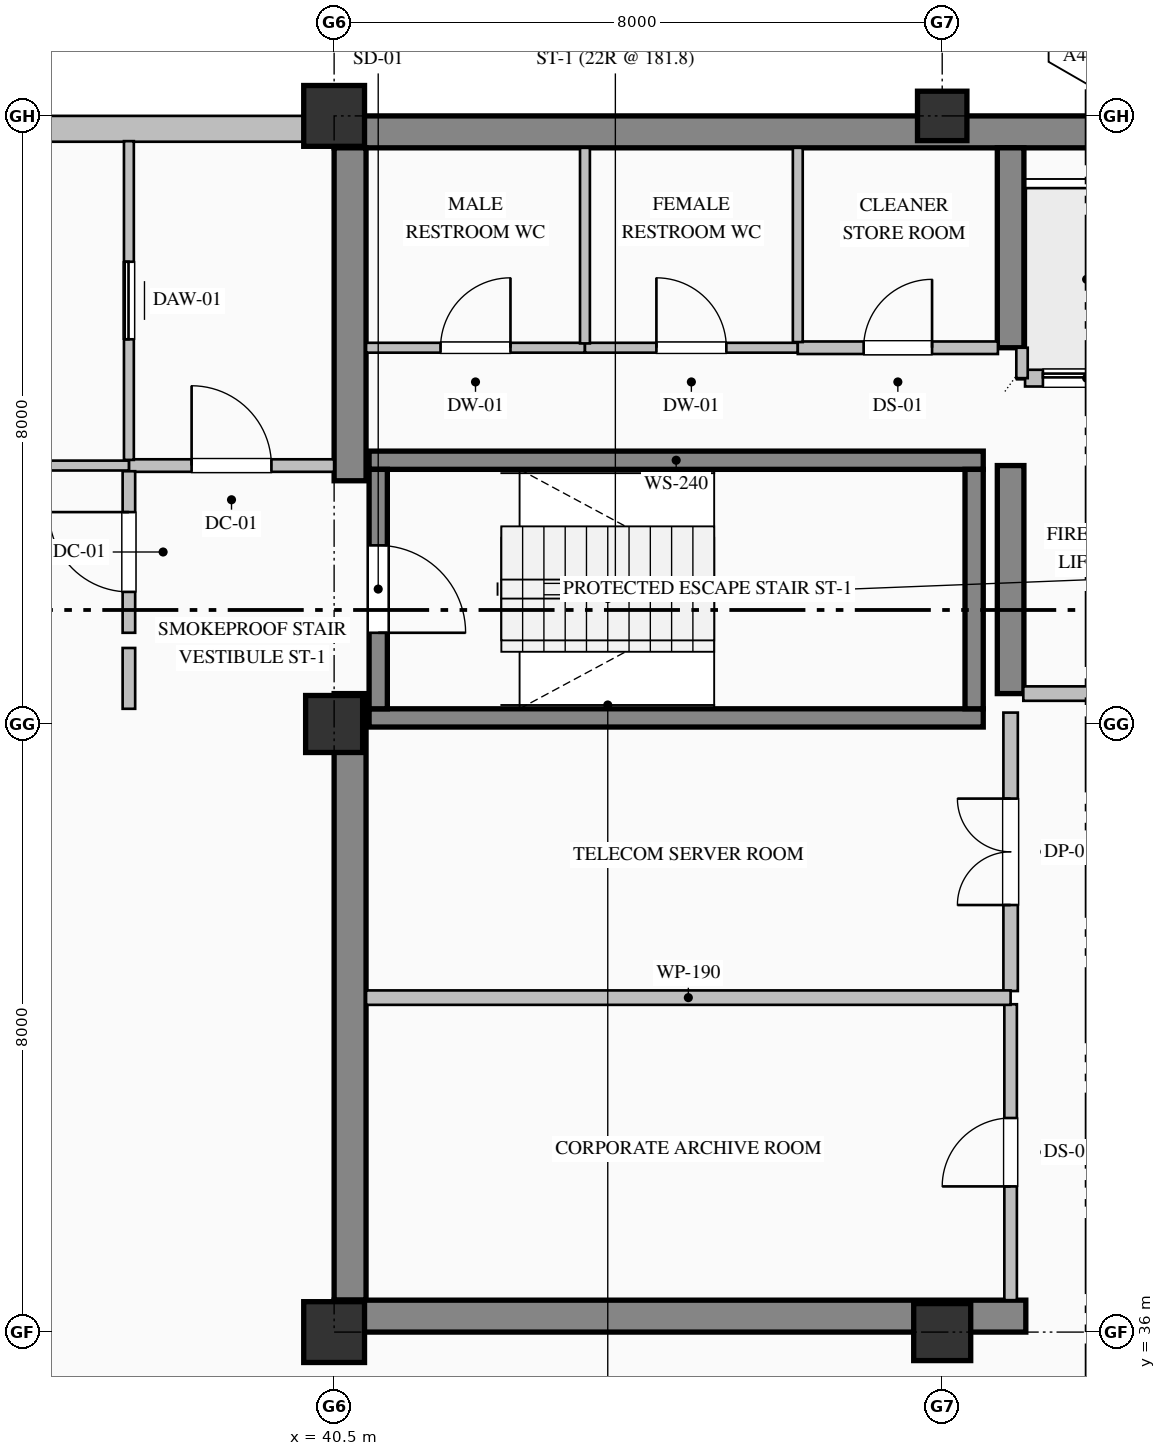
"""IFC4 building model, lengths in metres.
Left out: names, types, materials, properties, quantities, classifications, styles, units other than length and angle.
Written with IfcOpenShell. Run it as: python <this file> out.ifc"""

import sys

from ifc_helpers import new_model, si_unit, direction, frame, frame_2d, origin, origin_2d, place, context, subcontext, project, spatial, rectangle, hollow_rectangle, extrude, element, fill, save


model = new_model("IFC4")
c1 = context("Model", 3, precision=1e-05, world=origin(), true_north=direction((0.0, 1.0)))
c2 = subcontext(c1, "Body", "Model", "MODEL_VIEW")
j1 = project(units=[si_unit("LENGTHUNIT", "METRE"), si_unit("PLANEANGLEUNIT", "RADIAN")], contexts=[c1])
p1 = place(None, origin())
s1 = spatial("IfcSite", under=j1, at=p1, CompositionType="ELEMENT")
p2 = place(p1, origin())
s2 = spatial("IfcBuilding", under=s1, at=p2, CompositionType="ELEMENT")
p3 = place(p2, frame((0.0, 0.0, 287.2)))
s3 = spatial("IfcBuildingStorey", under=s2, at=p3, CompositionType="ELEMENT", Elevation=287.2)
p4 = place(p3, frame((40.5, 51.79, 0.0), z_axis=(0.0, 0.0, 1.0), x_axis=(1.0, 0.0, 0.0)))
e1 = element("IfcWall", 1, at=p4, inside=s3, PredefinedType="SHEAR", context=c2, shape_type="SweptSolid", body=[
    extrude(rectangle(XDim=23.5, YDim=0.42, at=frame_2d((11.75, 0.0))), origin(), (0.0, 0.0, 1.0), 3.785),
])
p5 = place(p3, frame((40.71, 36.42, 0.0), z_axis=(0.0, 0.0, 1.0), x_axis=(0.0, 1.0, 0.0)))
e2 = element("IfcWall", 2, at=p5, inside=s3, PredefinedType="SHEAR", context=c2, shape_type="SweptSolid", body=[
    extrude(rectangle(XDim=7.98, YDim=0.42, at=frame_2d((3.99, 0.0))), origin(), (0.0, 0.0, 1.0), 3.785),
])
p6 = place(p3, frame((40.71, 47.2, 0.0), z_axis=(0.0, 0.0, 1.0), x_axis=(0.0, 1.0, 0.0)))
e3 = element("IfcWall", 3, at=p6, inside=s3, PredefinedType="SHEAR", context=c2, shape_type="SweptSolid", body=[
    extrude(rectangle(XDim=4.38, YDim=0.42, at=frame_2d((2.19, 0.0))), origin(), (0.0, 0.0, 1.0), 3.785),
])
p7 = place(p3, frame((40.5, 36.21, 0.0), z_axis=(0.0, 0.0, 1.0), x_axis=(1.0, 0.0, 0.0)))
e4 = element("IfcWall", 4, at=p7, inside=s3, PredefinedType="SHEAR", context=c2, shape_type="SweptSolid", body=[
    extrude(rectangle(XDim=9.1, YDim=0.42, at=frame_2d((4.55, 0.0))), origin(), (0.0, 0.0, 1.0), 3.785),
])
p8 = place(p3, frame((49.4, 44.4, 0.0), z_axis=(0.0, 0.0, 1.0), x_axis=(0.0, 1.0, 0.0)))
e5 = element("IfcWall", 5, at=p8, inside=s3, PredefinedType="SHEAR", context=c2, shape_type="SweptSolid", body=[
    extrude(rectangle(XDim=3.0, YDim=0.35, at=frame_2d((1.5, 0.0))), origin(), (0.0, 0.0, 1.0), 3.785),
])
p9 = place(p3, frame((49.4, 48.95, 0.0), z_axis=(0.0, 0.0, 1.0), x_axis=(0.0, 1.0, 0.0)))
e6 = element("IfcWall", 6, at=p9, inside=s3, PredefinedType="SHEAR", context=c2, shape_type="SweptSolid", body=[
    extrude(rectangle(XDim=2.63, YDim=0.35, at=frame_2d((1.315, 0.0))), origin(), (0.0, 0.0, 1.0), 3.785),
])
p10 = place(p3, frame((40.5, 36.0, 0.0), z_axis=(0.0, 0.0, 1.0), x_axis=(1.0, 0.0, 0.0)))
e7 = element("IfcColumn", 7, at=p10, inside=s3, PredefinedType="COLUMN", context=c2, shape_type="SweptSolid", body=[
    extrude(hollow_rectangle(XDim=0.8, YDim=0.8, WallThickness=0.032, at=origin_2d()), origin(), (0.0, 0.0, 1.0), 4.0),
])
p11 = place(p3, frame((40.5, 44.0, 0.0), z_axis=(0.0, 0.0, 1.0), x_axis=(1.0, 0.0, 0.0)))
e8 = element("IfcColumn", 8, at=p11, inside=s3, PredefinedType="COLUMN", context=c2, shape_type="SweptSolid", body=[
    extrude(rectangle(XDim=0.75, YDim=0.75, at=origin_2d()), origin(), (0.0, 0.0, 1.0), 4.0),
])
p12 = place(p3, frame((40.5, 52.0, 0.0), z_axis=(0.0, 0.0, 1.0), x_axis=(1.0, 0.0, 0.0)))
e9 = element("IfcColumn", 9, at=p12, inside=s3, PredefinedType="COLUMN", context=c2, shape_type="SweptSolid", body=[
    extrude(hollow_rectangle(XDim=0.8, YDim=0.8, WallThickness=0.032, at=origin_2d()), origin(), (0.0, 0.0, 1.0), 4.0),
])
p13 = place(p3, frame((48.5, 36.0, 0.0), z_axis=(0.0, 0.0, 1.0), x_axis=(1.0, 0.0, 0.0)))
e10 = element("IfcColumn", 10, at=p13, inside=s3, PredefinedType="COLUMN", context=c2, shape_type="SweptSolid", body=[
    extrude(rectangle(XDim=0.75, YDim=0.75, at=origin_2d()), origin(), (0.0, 0.0, 1.0), 4.0),
])
p14 = place(p3, frame((48.5, 52.0, 0.0), z_axis=(0.0, 0.0, 1.0), x_axis=(1.0, 0.0, 0.0)))
e11 = element("IfcColumn", 11, at=p14, inside=s3, PredefinedType="COLUMN", context=c2, shape_type="SweptSolid", body=[
    extrude(hollow_rectangle(XDim=0.65, YDim=0.65, WallThickness=0.028, at=origin_2d()), origin(), (0.0, 0.0, 1.0), 4.0),
])
p15 = place(p3, frame((20.5, 51.83, 0.0), z_axis=(0.0, 0.0, 1.0), x_axis=(1.0, 0.0, 0.0)))
e12 = element("IfcWall", 12, at=p15, inside=s3, PredefinedType="SOLIDWALL", context=c2, shape_type="SweptSolid", body=[
    extrude(rectangle(XDim=20.02, YDim=0.34, at=frame_2d((10.01, 0.0))), origin(), (0.0, 0.0, 1.0), 3.335),
])
p16 = place(p15, frame((6.725, 0.0, 0.9)))
e13 = element("IfcOpeningElement", 13, at=p16, cuts=e12, PredefinedType="OPENING", context=c2, shape_type="SweptSolid", body=[
    extrude(rectangle(XDim=0.95, YDim=1.85, at=frame_2d((0.475, 0.925))), frame((0.0, 0.18, 0.0), z_axis=(0.0, -1.0, 0.0), x_axis=(1.0, 0.0, 0.0)), (0.0, 0.0, 1.0), 0.36),
])
for number, where, z_axis, x_axis in (
    (14, (40.96, 47.47, 0.0), (0.0, 0.0, 1.0), (1.0, 0.0, 0.0)),
    (15, (49.04, 44.08, 0.0), (0.0, 0.0, 1.0), (-1.0, 0.0, 0.0)),
):
    element("IfcWall", number, at=place(p3, frame(where, z_axis=z_axis, x_axis=x_axis)), inside=s3, PredefinedType="SOLIDWALL", context=c2, shape_type="SweptSolid", body=[
        extrude(rectangle(XDim=8.08, YDim=0.24, at=frame_2d((4.04, 0.0))), origin(), (0.0, 0.0, 1.0), 4.0),
    ])
p17 = place(p3, frame((41.08, 47.35, 0.0), z_axis=(0.0, 0.0, 1.0), x_axis=(0.0, -1.0, 0.0)))
e16 = element("IfcWall", 16, at=p17, inside=s3, PredefinedType="SOLIDWALL", context=c2, shape_type="SweptSolid", body=[
    extrude(rectangle(XDim=3.15, YDim=0.24, at=frame_2d((1.575, 0.0))), origin(), (0.0, 0.0, 1.0), 4.0),
])
p18 = place(p17, frame((1.0, 0.0, 0.0)))
e17 = element("IfcOpeningElement", 17, at=p18, cuts=e16, PredefinedType="OPENING", context=c2, shape_type="SweptSolid", body=[
    extrude(rectangle(XDim=1.15, YDim=2.2, at=frame_2d((0.575, 1.1))), frame((0.0, 0.13, 0.0), z_axis=(0.0, -1.0, 0.0), x_axis=(1.0, 0.0, 0.0)), (0.0, 0.0, 1.0), 0.26),
])
p19 = place(p3, frame((48.92, 44.2, 0.0), z_axis=(0.0, 0.0, 1.0), x_axis=(0.0, 1.0, 0.0)))
e18 = element("IfcWall", 18, at=p19, inside=s3, PredefinedType="SOLIDWALL", context=c2, shape_type="SweptSolid", body=[
    extrude(rectangle(XDim=3.15, YDim=0.24, at=frame_2d((1.575, 0.0))), origin(), (0.0, 0.0, 1.0), 4.0),
])
p20 = place(p3, frame((54.71, 48.55, 0.0), z_axis=(0.0, 0.0, 1.0), x_axis=(-1.0, 0.0, 0.0)))
e19 = element("IfcWall", 19, at=p20, inside=s3, PredefinedType="PARTITIONING", context=c2, shape_type="SweptSolid", body=[
    extrude(rectangle(XDim=5.12, YDim=0.22, at=frame_2d((2.56, 0.0))), origin(), (0.0, 0.0, 1.0), 3.785),
])
p21 = place(p20, frame((3.735, 0.0, 0.0)))
e20 = element("IfcOpeningElement", 20, at=p21, cuts=e19, PredefinedType="OPENING", context=c2, shape_type="SweptSolid", body=[
    extrude(rectangle(XDim=1.15, YDim=2.2, at=frame_2d((0.575, 1.1))), frame((0.0, 0.12, 0.0), z_axis=(0.0, -1.0, 0.0), x_axis=(1.0, 0.0, 0.0)), (0.0, 0.0, 1.0), 0.24),
])
p22 = place(p20, frame((0.935, 0.0, 0.0)))
e21 = element("IfcOpeningElement", 21, at=p22, cuts=e19, PredefinedType="OPENING", context=c2, shape_type="SweptSolid", body=[
    extrude(rectangle(XDim=1.15, YDim=2.2, at=frame_2d((0.575, 1.1))), frame((0.0, 0.12, 0.0), z_axis=(0.0, -1.0, 0.0), x_axis=(1.0, 0.0, 0.0)), (0.0, 0.0, 1.0), 0.24),
])
p23 = place(p3, frame((49.55, 48.55, 0.0), z_axis=(0.0, 0.0, 1.0), x_axis=(0.0, 1.0, 0.0)))
e22 = element("IfcWall", 22, at=p23, inside=s3, PredefinedType="PARTITIONING", context=c2, shape_type="SweptSolid", body=[
    extrude(rectangle(XDim=0.4, YDim=0.15, at=frame_2d((0.2, 0.0))), origin(), (0.0, 0.0, 1.0), 3.785),
])
p24 = place(p3, frame((37.8, 47.4, 0.0), z_axis=(0.0, 0.0, 1.0), x_axis=(1.0, 0.0, 0.0)))
e23 = element("IfcWall", 23, at=p24, inside=s3, PredefinedType="PARTITIONING", context=c2, shape_type="SweptSolid", body=[
    extrude(rectangle(XDim=2.7, YDim=0.165, at=frame_2d((1.35, 0.0))), origin(), (0.0, 0.0, 1.0), 3.785),
])
p25 = place(p24, frame((0.825, 0.0, 0.0)))
e24 = element("IfcOpeningElement", 24, at=p25, cuts=e23, PredefinedType="OPENING", context=c2, shape_type="SweptSolid", body=[
    extrude(rectangle(XDim=1.05, YDim=2.15, at=frame_2d((0.525, 1.075))), frame((0.0, 0.093, 0.0), z_axis=(0.0, -1.0, 0.0), x_axis=(1.0, 0.0, 0.0)), (0.0, 0.0, 1.0), 0.185),
])
p26 = place(p3, frame((37.8, 45.2, 0.0), z_axis=(0.0, 0.0, 1.0), x_axis=(0.0, 1.0, 0.0)))
e25 = element("IfcWall", 25, at=p26, inside=s3, PredefinedType="PARTITIONING", context=c2, shape_type="SweptSolid", body=[
    extrude(rectangle(XDim=2.125, YDim=0.165, at=frame_2d((1.063, 0.0))), origin(), (0.0, 0.0, 1.0), 3.785),
])
p27 = place(p26, frame((0.538, 0.0, 0.0)))
e26 = element("IfcOpeningElement", 26, at=p27, cuts=e25, PredefinedType="OPENING", context=c2, shape_type="SweptSolid", body=[
    extrude(rectangle(XDim=1.05, YDim=2.15, at=frame_2d((0.525, 1.075))), frame((0.0, 0.093, 0.0), z_axis=(0.0, -1.0, 0.0), x_axis=(1.0, 0.0, 0.0)), (0.0, 0.0, 1.0), 0.185),
])
p28 = place(p3, frame((37.8, 44.2, 0.0), z_axis=(0.0, 0.0, 1.0), x_axis=(0.0, 1.0, 0.0)))
e27 = element("IfcWall", 27, at=p28, inside=s3, PredefinedType="PARTITIONING", context=c2, shape_type="SweptSolid", body=[
    extrude(rectangle(XDim=0.8, YDim=0.165, at=frame_2d((0.4, 0.0))), origin(), (0.0, 0.0, 1.0), 3.785),
])
p29 = place(p3, frame((37.8, 47.475, 0.0), z_axis=(0.0, 0.0, 1.0), x_axis=(0.0, 1.0, 0.0)))
e28 = element("IfcWall", 28, at=p29, inside=s3, PredefinedType="PARTITIONING", context=c2, shape_type="SweptSolid", body=[
    extrude(rectangle(XDim=4.193, YDim=0.13, at=frame_2d((2.097, 0.0))), origin(), (0.0, 0.0, 1.0), 3.785),
])
p30 = place(p29, frame((1.587, 0.0, 0.0)))
e29 = element("IfcOpeningElement", 29, at=p30, cuts=e28, PredefinedType="OPENING", context=c2, shape_type="SweptSolid", body=[
    extrude(rectangle(XDim=1.02, YDim=2.15, at=frame_2d((0.51, 1.075))), frame((0.0, 0.075, 0.0), z_axis=(0.0, -1.0, 0.0), x_axis=(1.0, 0.0, 0.0)), (0.0, 0.0, 1.0), 0.15),
])
p31 = place(p3, frame((37.8, 47.4, 0.0), z_axis=(0.0, 0.0, 1.0), x_axis=(-1.0, 0.0, 0.0)))
e30 = element("IfcWall", 30, at=p31, inside=s3, PredefinedType="PARTITIONING", context=c2, shape_type="SweptSolid", body=[
    extrude(rectangle(XDim=2.4, YDim=0.13, at=frame_2d((1.2, 0.0))), origin(), (0.0, 0.0, 1.0), 3.785),
])
p32 = place(p3, frame((40.92, 48.95, 0.0), z_axis=(0.0, 0.0, 1.0), x_axis=(1.0, 0.0, 0.0)))
e31 = element("IfcWall", 31, at=p32, inside=s3, PredefinedType="PARTITIONING", context=c2, shape_type="SweptSolid", body=[
    extrude(rectangle(XDim=2.88, YDim=0.13, at=frame_2d((1.44, 0.0))), origin(), (0.0, 0.0, 1.0), 3.785),
])
p33 = place(p32, frame((0.98, 0.0, 0.0)))
e32 = element("IfcOpeningElement", 32, at=p33, cuts=e31, PredefinedType="OPENING", context=c2, shape_type="SweptSolid", body=[
    extrude(rectangle(XDim=0.92, YDim=2.15, at=frame_2d((0.46, 1.075))), frame((0.0, 0.075, 0.0), z_axis=(0.0, -1.0, 0.0), x_axis=(1.0, 0.0, 0.0)), (0.0, 0.0, 1.0), 0.15),
])
p34 = place(p3, frame((43.8, 48.95, 0.0), z_axis=(0.0, 0.0, 1.0), x_axis=(1.0, 0.0, 0.0)))
e33 = element("IfcWall", 33, at=p34, inside=s3, PredefinedType="PARTITIONING", context=c2, shape_type="SweptSolid", body=[
    extrude(rectangle(XDim=2.8, YDim=0.13, at=frame_2d((1.4, 0.0))), origin(), (0.0, 0.0, 1.0), 3.785),
])
p35 = place(p34, frame((0.94, 0.0, 0.0)))
e34 = element("IfcOpeningElement", 34, at=p35, cuts=e33, PredefinedType="OPENING", context=c2, shape_type="SweptSolid", body=[
    extrude(rectangle(XDim=0.92, YDim=2.15, at=frame_2d((0.46, 1.075))), frame((0.0, 0.075, 0.0), z_axis=(0.0, -1.0, 0.0), x_axis=(1.0, 0.0, 0.0)), (0.0, 0.0, 1.0), 0.15),
])
p36 = place(p3, frame((46.6, 48.95, 0.0), z_axis=(0.0, 0.0, 1.0), x_axis=(1.0, 0.0, 0.0)))
e35 = element("IfcWall", 35, at=p36, inside=s3, PredefinedType="PARTITIONING", context=c2, shape_type="SweptSolid", body=[
    extrude(rectangle(XDim=2.633, YDim=0.165, at=frame_2d((1.316, 0.0))), origin(), (0.0, 0.0, 1.0), 3.785),
])
p37 = place(p36, frame((0.866, 0.0, 0.0)))
e36 = element("IfcOpeningElement", 36, at=p37, cuts=e35, PredefinedType="OPENING", context=c2, shape_type="SweptSolid", body=[
    extrude(rectangle(XDim=0.9, YDim=2.15, at=frame_2d((0.45, 1.075))), frame((0.0, 0.093, 0.0), z_axis=(0.0, -1.0, 0.0), x_axis=(1.0, 0.0, 0.0)), (0.0, 0.0, 1.0), 0.185),
])
p38 = place(p3, frame((54.733, 44.4, 0.0), z_axis=(0.0, 0.0, 1.0), x_axis=(-1.0, 0.0, 0.0)))
e37 = element("IfcWall", 37, at=p38, inside=s3, PredefinedType="PARTITIONING", context=c2, shape_type="SweptSolid", body=[
    extrude(rectangle(XDim=5.166, YDim=0.19, at=frame_2d((2.583, 0.0))), origin(), (0.0, 0.0, 1.0), 3.785),
])
p39 = place(p38, frame((2.058, 0.0, 0.0)))
e38 = element("IfcOpeningElement", 38, at=p39, cuts=e37, PredefinedType="OPENING", context=c2, shape_type="SweptSolid", body=[
    extrude(rectangle(XDim=1.05, YDim=2.15, at=frame_2d((0.525, 1.075))), frame((0.0, 0.105, 0.0), z_axis=(0.0, -1.0, 0.0), x_axis=(1.0, 0.0, 0.0)), (0.0, 0.0, 1.0), 0.21),
])
p40 = place(p3, frame((49.4, 36.42, 0.0), z_axis=(0.0, 0.0, 1.0), x_axis=(0.0, 1.0, 0.0)))
e39 = element("IfcWall", 39, at=p40, inside=s3, PredefinedType="PARTITIONING", context=c2, shape_type="SweptSolid", body=[
    extrude(rectangle(XDim=3.893, YDim=0.165, at=frame_2d((1.947, 0.0))), origin(), (0.0, 0.0, 1.0), 3.027),
])
p41 = place(p40, frame((1.497, 0.0, 0.0)))
e40 = element("IfcOpeningElement", 40, at=p41, cuts=e39, PredefinedType="OPENING", context=c2, shape_type="SweptSolid", body=[
    extrude(rectangle(XDim=0.9, YDim=2.15, at=frame_2d((0.45, 1.075))), frame((0.0, 0.093, 0.0), z_axis=(0.0, -1.0, 0.0), x_axis=(1.0, 0.0, 0.0)), (0.0, 0.0, 1.0), 0.185),
])
p42 = place(p3, frame((49.4, 40.487, 0.0), z_axis=(0.0, 0.0, 1.0), x_axis=(0.0, 1.0, 0.0)))
e41 = element("IfcWall", 41, at=p42, inside=s3, PredefinedType="PARTITIONING", context=c2, shape_type="SweptSolid", body=[
    extrude(rectangle(XDim=3.663, YDim=0.19, at=frame_2d((1.832, 0.0))), origin(), (0.0, 0.0, 1.0), 3.027),
])
p43 = place(p42, frame((1.132, 0.0, 0.0)))
e42 = element("IfcOpeningElement", 42, at=p43, cuts=e41, PredefinedType="OPENING", context=c2, shape_type="SweptSolid", body=[
    extrude(rectangle(XDim=1.4, YDim=2.25, at=frame_2d((0.7, 1.125))), frame((0.0, 0.105, 0.0), z_axis=(0.0, -1.0, 0.0), x_axis=(1.0, 0.0, 0.0)), (0.0, 0.0, 1.0), 0.21),
])
p44 = place(p3, frame((40.92, 40.4, 0.0), z_axis=(0.0, 0.0, 1.0), x_axis=(1.0, 0.0, 0.0)))
e43 = element("IfcWall", 43, at=p44, inside=s3, PredefinedType="PARTITIONING", context=c2, shape_type="SweptSolid", body=[
    extrude(rectangle(XDim=8.48, YDim=0.19, at=frame_2d((4.24, 0.0))), origin(), (0.0, 0.0, 1.0), 3.785),
])
p45 = place(p3, frame((43.8, 51.58, 0.0), z_axis=(0.0, 0.0, 1.0), x_axis=(0.0, -1.0, 0.0)))
e44 = element("IfcWall", 44, at=p45, inside=s3, PredefinedType="PARTITIONING", context=c2, shape_type="SweptSolid", body=[
    extrude(rectangle(XDim=2.573, YDim=0.13, at=frame_2d((1.287, 0.0))), origin(), (0.0, 0.0, 1.0), 3.785),
])
p46 = place(p3, frame((46.6, 51.58, 0.0), z_axis=(0.0, 0.0, 1.0), x_axis=(0.0, -1.0, 0.0)))
e45 = element("IfcWall", 45, at=p46, inside=s3, PredefinedType="PARTITIONING", context=c2, shape_type="SweptSolid", body=[
    extrude(rectangle(XDim=2.556, YDim=0.13, at=frame_2d((1.278, 0.0))), origin(), (0.0, 0.0, 1.0), 3.785),
])
p47 = place(p18, origin())
e46 = element("IfcDoor", 46, at=p47, inside=s3, OperationType="SINGLE_SWING_RIGHT", PredefinedType="DOOR", context=c2, shape_type="SweptSolid", body=[
    extrude(rectangle(XDim=1.15, YDim=2.2, at=frame_2d((0.575, 1.1))), frame((0.0, 0.025, 0.0), z_axis=(0.0, -1.0, 0.0), x_axis=(1.0, 0.0, 0.0)), (0.0, 0.0, 1.0), 0.05),
])
fill(e17, e46)
p48 = place(p21, origin())
e47 = element("IfcDoor", 47, at=p48, inside=s3, OperationType="DOUBLE_DOOR_SLIDING", PredefinedType="DOOR", context=c2, shape_type="SweptSolid", body=[
    extrude(rectangle(XDim=1.15, YDim=2.2, at=frame_2d((0.575, 1.1))), frame((0.0, 0.025, 0.0), z_axis=(0.0, -1.0, 0.0), x_axis=(1.0, 0.0, 0.0)), (0.0, 0.0, 1.0), 0.05),
])
fill(e20, e47)
p49 = place(p25, origin())
e48 = element("IfcDoor", 48, at=p49, inside=s3, OperationType="SINGLE_SWING_LEFT", PredefinedType="DOOR", context=c2, shape_type="SweptSolid", body=[
    extrude(rectangle(XDim=1.05, YDim=2.15, at=frame_2d((0.525, 1.075))), frame((0.0, 0.025, 0.0), z_axis=(0.0, -1.0, 0.0), x_axis=(1.0, 0.0, 0.0)), (0.0, 0.0, 1.0), 0.05),
])
fill(e24, e48)
p50 = place(p27, origin())
e49 = element("IfcDoor", 49, at=p50, inside=s3, OperationType="SINGLE_SWING_RIGHT", PredefinedType="DOOR", context=c2, shape_type="SweptSolid", body=[
    extrude(rectangle(XDim=1.05, YDim=2.15, at=frame_2d((0.525, 1.075))), frame((0.0, 0.025, 0.0), z_axis=(0.0, -1.0, 0.0), x_axis=(1.0, 0.0, 0.0)), (0.0, 0.0, 1.0), 0.05),
])
fill(e26, e49)
p51 = place(p30, origin())
e50 = element("IfcDoor", 50, at=p51, inside=s3, OperationType="SLIDING_TO_LEFT", PredefinedType="DOOR", context=c2, shape_type="SweptSolid", body=[
    extrude(rectangle(XDim=1.02, YDim=2.15, at=frame_2d((0.51, 1.075))), frame((0.0, 0.025, 0.0), z_axis=(0.0, -1.0, 0.0), x_axis=(1.0, 0.0, 0.0)), (0.0, 0.0, 1.0), 0.05),
])
fill(e29, e50)
p52 = place(p41, origin())
e51 = element("IfcDoor", 51, at=p52, inside=s3, OperationType="SINGLE_SWING_LEFT", PredefinedType="DOOR", context=c2, shape_type="SweptSolid", body=[
    extrude(rectangle(XDim=0.9, YDim=2.15, at=frame_2d((0.45, 1.075))), frame((0.0, 0.025, 0.0), z_axis=(0.0, -1.0, 0.0), x_axis=(1.0, 0.0, 0.0)), (0.0, 0.0, 1.0), 0.05),
])
fill(e40, e51)
p53 = place(p43, origin())
e52 = element("IfcDoor", 52, at=p53, inside=s3, OperationType="DOUBLE_DOOR_SINGLE_SWING", PredefinedType="DOOR", context=c2, shape_type="SweptSolid", body=[
    extrude(rectangle(XDim=1.4, YDim=2.25, at=frame_2d((0.7, 1.125))), frame((0.0, 0.025, 0.0), z_axis=(0.0, -1.0, 0.0), x_axis=(1.0, 0.0, 0.0)), (0.0, 0.0, 1.0), 0.05),
])
fill(e42, e52)
p54 = place(p33, origin())
e53 = element("IfcDoor", 53, at=p54, inside=s3, OperationType="SINGLE_SWING_RIGHT", PredefinedType="DOOR", context=c2, shape_type="SweptSolid", body=[
    extrude(rectangle(XDim=0.92, YDim=2.15, at=frame_2d((0.46, 1.075))), frame((0.0, 0.025, 0.0), z_axis=(0.0, -1.0, 0.0), x_axis=(1.0, 0.0, 0.0)), (0.0, 0.0, 1.0), 0.05),
])
fill(e32, e53)
p55 = place(p35, origin())
e54 = element("IfcDoor", 54, at=p55, inside=s3, OperationType="SINGLE_SWING_LEFT", PredefinedType="DOOR", context=c2, shape_type="SweptSolid", body=[
    extrude(rectangle(XDim=0.92, YDim=2.15, at=frame_2d((0.46, 1.075))), frame((0.0, 0.025, 0.0), z_axis=(0.0, -1.0, 0.0), x_axis=(1.0, 0.0, 0.0)), (0.0, 0.0, 1.0), 0.05),
])
fill(e34, e54)
p56 = place(p37, origin())
e55 = element("IfcDoor", 55, at=p56, inside=s3, OperationType="SINGLE_SWING_RIGHT", PredefinedType="DOOR", context=c2, shape_type="SweptSolid", body=[
    extrude(rectangle(XDim=0.9, YDim=2.15, at=frame_2d((0.45, 1.075))), frame((0.0, 0.025, 0.0), z_axis=(0.0, -1.0, 0.0), x_axis=(1.0, 0.0, 0.0)), (0.0, 0.0, 1.0), 0.05),
])
fill(e36, e55)
save(model, sys.argv[1])
